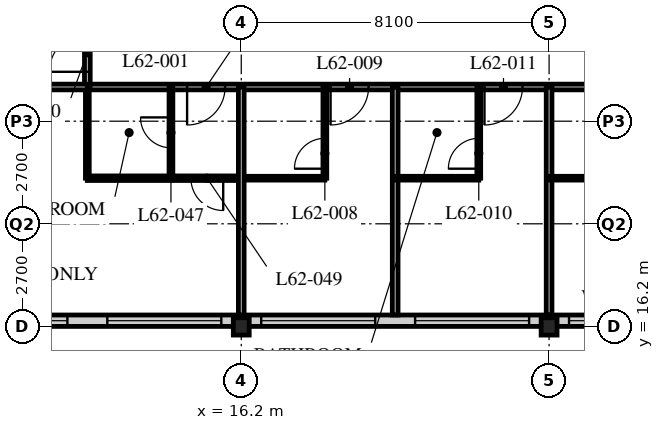
"""IFC4 building model, lengths in metres.
Left out: names, types, materials, properties, quantities, classifications, styles, units other than length and angle.
Written with IfcOpenShell. Run it as: python <this file> out.ifc"""

import sys

from ifc_helpers import new_model, si_unit, direction, frame, frame_2d, origin, origin_2d, place, context, subcontext, project, spatial, rectangle, i_section, extrude, element, fill, save


model = new_model("IFC4")
c1 = context("Model", 3, precision=1e-05, world=origin(), true_north=direction((0.0, 1.0)))
c2 = subcontext(c1, "Body", "Model", "MODEL_VIEW")
j1 = project(units=[si_unit("LENGTHUNIT", "METRE"), si_unit("PLANEANGLEUNIT", "RADIAN")], contexts=[c1])
p1 = place(None, origin())
s1 = spatial("IfcSite", under=j1, at=p1, CompositionType="ELEMENT")
p2 = place(p1, origin())
s2 = spatial("IfcBuilding", under=s1, at=p2, CompositionType="ELEMENT")
p3 = place(p2, frame((0.0, 0.0, 242.4)))
s3 = spatial("IfcBuildingStorey", under=s2, at=p3, CompositionType="ELEMENT", Elevation=242.4)
for number, where, z_axis, x_axis in (
    (1, (16.2, 16.2, 0.0), (0.0, 0.0, 1.0), (1.0, 0.0, 0.0)),
    (2, (24.3, 16.2, 0.0), (0.0, 0.0, 1.0), (1.0, 0.0, 0.0)),
):
    element("IfcColumn", number, at=place(p3, frame(where, z_axis=z_axis, x_axis=x_axis)), inside=s3, PredefinedType="COLUMN", context=c2, shape_type="SweptSolid", body=[
        extrude(i_section(OverallWidth=0.418, OverallDepth=0.456, WebThickness=0.042, FlangeThickness=0.067, FilletRadius=0.015, at=origin_2d()), origin(), (0.0, 0.0, 1.0), 3.9),
    ])
p4 = place(p3, frame((8.4, 16.35, 0.0), z_axis=(0.0, 0.0, 1.0), x_axis=(1.0, 0.0, 0.0)))
e3 = element("IfcWall", 3, at=p4, inside=s3, PredefinedType="SOLIDWALL", context=c2, shape_type="SweptSolid", body=[
    extrude(rectangle(XDim=40.2, YDim=0.3, at=frame_2d((20.1, 0.0))), origin(), (0.0, 0.0, 1.0), 3.69),
])
p5 = place(p4, frame((21.475, 0.0, 0.0)))
e4 = element("IfcOpeningElement", 4, at=p5, cuts=e3, PredefinedType="OPENING", context=c2, shape_type="SweptSolid", body=[
    extrude(rectangle(XDim=1.0, YDim=2.1, at=frame_2d((0.5, 1.05))), frame((0.0, 0.16, 0.0), z_axis=(0.0, -1.0, 0.0), x_axis=(1.0, 0.0, 0.0)), (0.0, 0.0, 1.0), 0.32),
])
p6 = place(p4, frame((0.225, 0.0, 0.6)))
e5 = element("IfcOpeningElement", 5, at=p6, cuts=e3, PredefinedType="OPENING", context=c2, shape_type="SweptSolid", body=[
    extrude(rectangle(XDim=3.0, YDim=2.3, at=frame_2d((1.5, 1.15))), frame((0.0, 0.16, 0.0), z_axis=(0.0, -1.0, 0.0), x_axis=(1.0, 0.0, 0.0)), (0.0, 0.0, 1.0), 0.32),
])
p7 = place(p4, frame((4.275, 0.0, 0.6)))
e6 = element("IfcOpeningElement", 6, at=p7, cuts=e3, PredefinedType="OPENING", context=c2, shape_type="SweptSolid", body=[
    extrude(rectangle(XDim=3.0, YDim=2.3, at=frame_2d((1.5, 1.15))), frame((0.0, 0.16, 0.0), z_axis=(0.0, -1.0, 0.0), x_axis=(1.0, 0.0, 0.0)), (0.0, 0.0, 1.0), 0.32),
])
p8 = place(p4, frame((8.325, 0.0, 0.6)))
e7 = element("IfcOpeningElement", 7, at=p8, cuts=e3, PredefinedType="OPENING", context=c2, shape_type="SweptSolid", body=[
    extrude(rectangle(XDim=3.0, YDim=2.3, at=frame_2d((1.5, 1.15))), frame((0.0, 0.16, 0.0), z_axis=(0.0, -1.0, 0.0), x_axis=(1.0, 0.0, 0.0)), (0.0, 0.0, 1.0), 0.32),
])
p9 = place(p4, frame((12.375, 0.0, 0.6)))
e8 = element("IfcOpeningElement", 8, at=p9, cuts=e3, PredefinedType="OPENING", context=c2, shape_type="SweptSolid", body=[
    extrude(rectangle(XDim=3.0, YDim=2.3, at=frame_2d((1.5, 1.15))), frame((0.0, 0.16, 0.0), z_axis=(0.0, -1.0, 0.0), x_axis=(1.0, 0.0, 0.0)), (0.0, 0.0, 1.0), 0.32),
])
p10 = place(p4, frame((16.425, 0.0, 0.6)))
e9 = element("IfcOpeningElement", 9, at=p10, cuts=e3, PredefinedType="OPENING", context=c2, shape_type="SweptSolid", body=[
    extrude(rectangle(XDim=3.0, YDim=2.3, at=frame_2d((1.5, 1.15))), frame((0.0, 0.16, 0.0), z_axis=(0.0, -1.0, 0.0), x_axis=(1.0, 0.0, 0.0)), (0.0, 0.0, 1.0), 0.32),
])
p11 = place(p4, frame((24.525, 0.0, 0.6)))
e10 = element("IfcOpeningElement", 10, at=p11, cuts=e3, PredefinedType="OPENING", context=c2, shape_type="SweptSolid", body=[
    extrude(rectangle(XDim=3.0, YDim=2.3, at=frame_2d((1.5, 1.15))), frame((0.0, 0.16, 0.0), z_axis=(0.0, -1.0, 0.0), x_axis=(1.0, 0.0, 0.0)), (0.0, 0.0, 1.0), 0.32),
])
p12 = place(p4, frame((28.575, 0.0, 0.6)))
e11 = element("IfcOpeningElement", 11, at=p12, cuts=e3, PredefinedType="OPENING", context=c2, shape_type="SweptSolid", body=[
    extrude(rectangle(XDim=3.0, YDim=2.3, at=frame_2d((1.5, 1.15))), frame((0.0, 0.16, 0.0), z_axis=(0.0, -1.0, 0.0), x_axis=(1.0, 0.0, 0.0)), (0.0, 0.0, 1.0), 0.32),
])
p13 = place(p4, frame((32.625, 0.0, 0.6)))
e12 = element("IfcOpeningElement", 12, at=p13, cuts=e3, PredefinedType="OPENING", context=c2, shape_type="SweptSolid", body=[
    extrude(rectangle(XDim=3.0, YDim=2.3, at=frame_2d((1.5, 1.15))), frame((0.0, 0.16, 0.0), z_axis=(0.0, -1.0, 0.0), x_axis=(1.0, 0.0, 0.0)), (0.0, 0.0, 1.0), 0.32),
])
p14 = place(p4, frame((36.675, 0.0, 0.6)))
e13 = element("IfcOpeningElement", 13, at=p14, cuts=e3, PredefinedType="OPENING", context=c2, shape_type="SweptSolid", body=[
    extrude(rectangle(XDim=3.0, YDim=2.3, at=frame_2d((1.5, 1.15))), frame((0.0, 0.16, 0.0), z_axis=(0.0, -1.0, 0.0), x_axis=(1.0, 0.0, 0.0)), (0.0, 0.0, 1.0), 0.32),
])
p15 = place(p3, frame((12.15, 22.5, 0.0), z_axis=(0.0, 0.0, 1.0), x_axis=(1.0, 0.0, 0.0)))
e14 = element("IfcWall", 14, at=p15, inside=s3, PredefinedType="PARTITIONING", context=c2, shape_type="SweptSolid", body=[
    extrude(rectangle(XDim=32.4, YDim=0.15, at=frame_2d((16.2, 0.0))), origin(), (0.0, 0.0, 1.0), 3.69),
])
p16 = place(p15, frame((6.4, 0.0, 0.0)))
e15 = element("IfcOpeningElement", 15, at=p16, cuts=e14, PredefinedType="OPENING", context=c2, shape_type="SweptSolid", body=[
    extrude(rectangle(XDim=1.0, YDim=2.1, at=frame_2d((0.5, 1.05))), frame((0.0, 0.085, 0.0), z_axis=(0.0, -1.0, 0.0), x_axis=(1.0, 0.0, 0.0)), (0.0, 0.0, 1.0), 0.17),
])
p17 = place(p15, frame((10.45, 0.0, 0.0)))
e16 = element("IfcOpeningElement", 16, at=p17, cuts=e14, PredefinedType="OPENING", context=c2, shape_type="SweptSolid", body=[
    extrude(rectangle(XDim=1.0, YDim=2.1, at=frame_2d((0.5, 1.05))), frame((0.0, 0.085, 0.0), z_axis=(0.0, -1.0, 0.0), x_axis=(1.0, 0.0, 0.0)), (0.0, 0.0, 1.0), 0.17),
])
p18 = place(p15, frame((14.5, 0.0, 0.0)))
e17 = element("IfcOpeningElement", 17, at=p18, cuts=e14, PredefinedType="OPENING", context=c2, shape_type="SweptSolid", body=[
    extrude(rectangle(XDim=1.0, YDim=2.1, at=frame_2d((0.5, 1.05))), frame((0.0, 0.085, 0.0), z_axis=(0.0, -1.0, 0.0), x_axis=(1.0, 0.0, 0.0)), (0.0, 0.0, 1.0), 0.17),
])
p19 = place(p15, frame((17.725, 0.0, 0.0)))
e18 = element("IfcOpeningElement", 18, at=p19, cuts=e14, PredefinedType="OPENING", context=c2, shape_type="SweptSolid", body=[
    extrude(rectangle(XDim=1.0, YDim=2.1, at=frame_2d((0.5, 1.05))), frame((0.0, 0.085, 0.0), z_axis=(0.0, -1.0, 0.0), x_axis=(1.0, 0.0, 0.0)), (0.0, 0.0, 1.0), 0.17),
])
p20 = place(p15, frame((22.6, 0.0, 0.0)))
e19 = element("IfcOpeningElement", 19, at=p20, cuts=e14, PredefinedType="OPENING", context=c2, shape_type="SweptSolid", body=[
    extrude(rectangle(XDim=1.0, YDim=2.1, at=frame_2d((0.5, 1.05))), frame((0.0, 0.085, 0.0), z_axis=(0.0, -1.0, 0.0), x_axis=(1.0, 0.0, 0.0)), (0.0, 0.0, 1.0), 0.17),
])
p21 = place(p15, frame((26.65, 0.0, 0.0)))
e20 = element("IfcOpeningElement", 20, at=p21, cuts=e14, PredefinedType="OPENING", context=c2, shape_type="SweptSolid", body=[
    extrude(rectangle(XDim=1.0, YDim=2.1, at=frame_2d((0.5, 1.05))), frame((0.0, 0.085, 0.0), z_axis=(0.0, -1.0, 0.0), x_axis=(1.0, 0.0, 0.0)), (0.0, 0.0, 1.0), 0.17),
])
p22 = place(p15, frame((2.625, 0.0, 0.0)))
e21 = element("IfcOpeningElement", 21, at=p22, cuts=e14, PredefinedType="OPENING", context=c2, shape_type="SweptSolid", body=[
    extrude(rectangle(XDim=1.0, YDim=2.1, at=frame_2d((0.5, 1.05))), frame((0.0, 0.085, 0.0), z_axis=(0.0, -1.0, 0.0), x_axis=(1.0, 0.0, 0.0)), (0.0, 0.0, 1.0), 0.17),
])
p23 = place(p15, frame((28.775, 0.0, 0.0)))
e22 = element("IfcOpeningElement", 22, at=p23, cuts=e14, PredefinedType="OPENING", context=c2, shape_type="SweptSolid", body=[
    extrude(rectangle(XDim=1.0, YDim=2.1, at=frame_2d((0.5, 1.05))), frame((0.0, 0.085, 0.0), z_axis=(0.0, -1.0, 0.0), x_axis=(1.0, 0.0, 0.0)), (0.0, 0.0, 1.0), 0.17),
])
p24 = place(p3, frame((12.15, 22.5, 0.0), z_axis=(0.0, 0.0, 1.0), x_axis=(0.0, 1.0, 0.0)))
e23 = element("IfcWall", 23, at=p24, inside=s3, PredefinedType="PARTITIONING", context=c2, shape_type="SweptSolid", body=[
    extrude(rectangle(XDim=26.1, YDim=0.15, at=frame_2d((13.05, 0.0))), origin(), (0.0, 0.0, 1.0), 3.69),
])
p25 = place(p24, frame((0.4, 0.0, 0.0)))
e24 = element("IfcOpeningElement", 24, at=p25, cuts=e23, PredefinedType="OPENING", context=c2, shape_type="SweptSolid", body=[
    extrude(rectangle(XDim=1.0, YDim=2.1, at=frame_2d((0.5, 1.05))), frame((0.0, 0.085, 0.0), z_axis=(0.0, -1.0, 0.0), x_axis=(1.0, 0.0, 0.0)), (0.0, 0.0, 1.0), 0.17),
])
p26 = place(p24, frame((14.35, 0.0, 0.0)))
e25 = element("IfcOpeningElement", 25, at=p26, cuts=e23, PredefinedType="OPENING", context=c2, shape_type="SweptSolid", body=[
    extrude(rectangle(XDim=1.0, YDim=2.1, at=frame_2d((0.5, 1.05))), frame((0.0, 0.085, 0.0), z_axis=(0.0, -1.0, 0.0), x_axis=(1.0, 0.0, 0.0)), (0.0, 0.0, 1.0), 0.17),
])
p27 = place(p3, frame((16.2, 20.1, 0.0), z_axis=(0.0, 0.0, 1.0), x_axis=(1.0, 0.0, 0.0)))
e26 = element("IfcWall", 26, at=p27, inside=s3, PredefinedType="PARTITIONING", context=c2, shape_type="SweptSolid", body=[
    extrude(rectangle(XDim=2.2, YDim=0.1, at=frame_2d((1.1, 0.0))), origin(), (0.0, 0.0, 1.0), 3.69),
])
p28 = place(p3, frame((18.4, 22.5, 0.0), z_axis=(0.0, 0.0, 1.0), x_axis=(0.0, -1.0, 0.0)))
e27 = element("IfcWall", 27, at=p28, inside=s3, PredefinedType="PARTITIONING", context=c2, shape_type="SweptSolid", body=[
    extrude(rectangle(XDim=2.4, YDim=0.1, at=frame_2d((1.2, 0.0))), origin(), (0.0, 0.0, 1.0), 3.69),
])
p29 = place(p28, frame((1.35, 0.0, 0.0)))
e28 = element("IfcOpeningElement", 28, at=p29, cuts=e27, PredefinedType="OPENING", context=c2, shape_type="SweptSolid", body=[
    extrude(rectangle(XDim=0.8, YDim=2.1, at=frame_2d((0.4, 1.05))), frame((0.0, 0.06, 0.0), z_axis=(0.0, -1.0, 0.0), x_axis=(1.0, 0.0, 0.0)), (0.0, 0.0, 1.0), 0.12),
])
p30 = place(p3, frame((20.25, 22.5, 0.0), z_axis=(0.0, 0.0, 1.0), x_axis=(0.0, -1.0, 0.0)))
e29 = element("IfcWall", 29, at=p30, inside=s3, PredefinedType="PARTITIONING", context=c2, shape_type="SweptSolid", body=[
    extrude(rectangle(XDim=6.0, YDim=0.15, at=frame_2d((3.0, 0.0))), origin(), (0.0, 0.0, 1.0), 3.69),
])
p31 = place(p3, frame((20.25, 20.1, 0.0), z_axis=(0.0, 0.0, 1.0), x_axis=(1.0, 0.0, 0.0)))
e30 = element("IfcWall", 30, at=p31, inside=s3, PredefinedType="PARTITIONING", context=c2, shape_type="SweptSolid", body=[
    extrude(rectangle(XDim=2.2, YDim=0.1, at=frame_2d((1.1, 0.0))), origin(), (0.0, 0.0, 1.0), 3.69),
])
p32 = place(p3, frame((22.45, 22.5, 0.0), z_axis=(0.0, 0.0, 1.0), x_axis=(0.0, -1.0, 0.0)))
e31 = element("IfcWall", 31, at=p32, inside=s3, PredefinedType="PARTITIONING", context=c2, shape_type="SweptSolid", body=[
    extrude(rectangle(XDim=2.4, YDim=0.1, at=frame_2d((1.2, 0.0))), origin(), (0.0, 0.0, 1.0), 3.69),
])
p33 = place(p32, frame((1.35, 0.0, 0.0)))
e32 = element("IfcOpeningElement", 32, at=p33, cuts=e31, PredefinedType="OPENING", context=c2, shape_type="SweptSolid", body=[
    extrude(rectangle(XDim=0.8, YDim=2.1, at=frame_2d((0.4, 1.05))), frame((0.0, 0.06, 0.0), z_axis=(0.0, -1.0, 0.0), x_axis=(1.0, 0.0, 0.0)), (0.0, 0.0, 1.0), 0.12),
])
p34 = place(p3, frame((24.3, 22.5, 0.0), z_axis=(0.0, 0.0, 1.0), x_axis=(0.0, -1.0, 0.0)))
e33 = element("IfcWall", 33, at=p34, inside=s3, PredefinedType="PARTITIONING", context=c2, shape_type="SweptSolid", body=[
    extrude(rectangle(XDim=6.0, YDim=0.15, at=frame_2d((3.0, 0.0))), origin(), (0.0, 0.0, 1.0), 2.928),
])
p35 = place(p3, frame((24.3, 20.1, 0.0), z_axis=(0.0, 0.0, 1.0), x_axis=(1.0, 0.0, 0.0)))
e34 = element("IfcWall", 34, at=p35, inside=s3, PredefinedType="PARTITIONING", context=c2, shape_type="SweptSolid", body=[
    extrude(rectangle(XDim=2.2, YDim=0.1, at=frame_2d((1.1, 0.0))), origin(), (0.0, 0.0, 1.0), 3.69),
])
p36 = place(p3, frame((12.15, 20.1, 0.0), z_axis=(0.0, 0.0, 1.0), x_axis=(1.0, 0.0, 0.0)))
e35 = element("IfcWall", 35, at=p36, inside=s3, PredefinedType="PARTITIONING", context=c2, shape_type="SweptSolid", body=[
    extrude(rectangle(XDim=4.05, YDim=0.12, at=frame_2d((2.025, 0.0))), origin(), (0.0, 0.0, 1.0), 3.69),
])
p37 = place(p36, frame((2.725, 0.0, 0.0)))
e36 = element("IfcOpeningElement", 36, at=p37, cuts=e35, PredefinedType="OPENING", context=c2, shape_type="SweptSolid", body=[
    extrude(rectangle(XDim=0.85, YDim=2.1, at=frame_2d((0.425, 1.05))), frame((0.0, 0.07, 0.0), z_axis=(0.0, -1.0, 0.0), x_axis=(1.0, 0.0, 0.0)), (0.0, 0.0, 1.0), 0.14),
])
p38 = place(p3, frame((14.35, 22.5, 0.0), z_axis=(0.0, 0.0, 1.0), x_axis=(0.0, -1.0, 0.0)))
e37 = element("IfcWall", 37, at=p38, inside=s3, PredefinedType="PARTITIONING", context=c2, shape_type="SweptSolid", body=[
    extrude(rectangle(XDim=2.4, YDim=0.1, at=frame_2d((1.2, 0.0))), origin(), (0.0, 0.0, 1.0), 3.69),
])
p39 = place(p38, frame((0.8, 0.0, 0.0)))
e38 = element("IfcOpeningElement", 38, at=p39, cuts=e37, PredefinedType="OPENING", context=c2, shape_type="SweptSolid", body=[
    extrude(rectangle(XDim=0.8, YDim=2.1, at=frame_2d((0.4, 1.05))), frame((0.0, 0.06, 0.0), z_axis=(0.0, -1.0, 0.0), x_axis=(1.0, 0.0, 0.0)), (0.0, 0.0, 1.0), 0.12),
])
p40 = place(p3, frame((12.15, 22.5, 0.0), z_axis=(0.0, 0.0, 1.0), x_axis=(0.0, -1.0, 0.0)))
e39 = element("IfcWall", 39, at=p40, inside=s3, PredefinedType="PARTITIONING", context=c2, shape_type="SweptSolid", body=[
    extrude(rectangle(XDim=2.4, YDim=0.1, at=frame_2d((1.2, 0.0))), origin(), (0.0, 0.0, 1.0), 3.69),
])
p41 = place(p3, frame((4.35, 22.5, 0.0), z_axis=(0.0, 0.0, 1.0), x_axis=(1.0, 0.0, 0.0)))
e40 = element("IfcWall", 40, at=p41, inside=s3, PredefinedType="PARTITIONING", context=c2, shape_type="SweptSolid", body=[
    extrude(rectangle(XDim=7.8, YDim=0.15, at=frame_2d((3.9, 0.0))), origin(), (0.0, 0.0, 1.0), 3.69),
])
p42 = place(p3, frame((16.2, 22.5, 0.0), z_axis=(0.0, 0.0, 1.0), x_axis=(0.0, -1.0, 0.0)))
e41 = element("IfcWall", 41, at=p42, inside=s3, PredefinedType="PARTITIONING", context=c2, shape_type="SweptSolid", body=[
    extrude(rectangle(XDim=6.0, YDim=0.15, at=frame_2d((3.0, 0.0))), origin(), (0.0, 0.0, 1.0), 2.928),
])
p43 = place(p6, origin())
e42 = element("IfcWindow", 42, at=p43, inside=s3, PartitioningType="SINGLE_PANEL", PredefinedType="WINDOW", context=c2, shape_type="SweptSolid", body=[
    extrude(rectangle(XDim=3.0, YDim=2.3, at=frame_2d((1.5, 1.15))), frame((0.0, 0.03, 0.0), z_axis=(0.0, -1.0, 0.0), x_axis=(1.0, 0.0, 0.0)), (0.0, 0.0, 1.0), 0.06),
])
fill(e5, e42)
p44 = place(p7, origin())
e43 = element("IfcWindow", 43, at=p44, inside=s3, PartitioningType="SINGLE_PANEL", PredefinedType="WINDOW", context=c2, shape_type="SweptSolid", body=[
    extrude(rectangle(XDim=3.0, YDim=2.3, at=frame_2d((1.5, 1.15))), frame((0.0, 0.03, 0.0), z_axis=(0.0, -1.0, 0.0), x_axis=(1.0, 0.0, 0.0)), (0.0, 0.0, 1.0), 0.06),
])
fill(e6, e43)
p45 = place(p8, origin())
e44 = element("IfcWindow", 44, at=p45, inside=s3, PartitioningType="SINGLE_PANEL", PredefinedType="WINDOW", context=c2, shape_type="SweptSolid", body=[
    extrude(rectangle(XDim=3.0, YDim=2.3, at=frame_2d((1.5, 1.15))), frame((0.0, 0.03, 0.0), z_axis=(0.0, -1.0, 0.0), x_axis=(1.0, 0.0, 0.0)), (0.0, 0.0, 1.0), 0.06),
])
fill(e7, e44)
p46 = place(p9, origin())
e45 = element("IfcWindow", 45, at=p46, inside=s3, PartitioningType="SINGLE_PANEL", PredefinedType="WINDOW", context=c2, shape_type="SweptSolid", body=[
    extrude(rectangle(XDim=3.0, YDim=2.3, at=frame_2d((1.5, 1.15))), frame((0.0, 0.03, 0.0), z_axis=(0.0, -1.0, 0.0), x_axis=(1.0, 0.0, 0.0)), (0.0, 0.0, 1.0), 0.06),
])
fill(e8, e45)
p47 = place(p10, origin())
e46 = element("IfcWindow", 46, at=p47, inside=s3, PartitioningType="SINGLE_PANEL", PredefinedType="WINDOW", context=c2, shape_type="SweptSolid", body=[
    extrude(rectangle(XDim=3.0, YDim=2.3, at=frame_2d((1.5, 1.15))), frame((0.0, 0.03, 0.0), z_axis=(0.0, -1.0, 0.0), x_axis=(1.0, 0.0, 0.0)), (0.0, 0.0, 1.0), 0.06),
])
fill(e9, e46)
p48 = place(p29, origin())
e47 = element("IfcDoor", 47, at=p48, inside=s3, OperationType="SINGLE_SWING_LEFT", PredefinedType="DOOR", context=c2, shape_type="SweptSolid", body=[
    extrude(rectangle(XDim=0.8, YDim=2.1, at=frame_2d((0.4, 1.05))), frame((0.0, 0.025, 0.0), z_axis=(0.0, -1.0, 0.0), x_axis=(1.0, 0.0, 0.0)), (0.0, 0.0, 1.0), 0.05),
])
fill(e28, e47)
p49 = place(p16, origin())
e48 = element("IfcDoor", 48, at=p49, inside=s3, OperationType="SINGLE_SWING_RIGHT", PredefinedType="DOOR", context=c2, shape_type="SweptSolid", body=[
    extrude(rectangle(XDim=1.0, YDim=2.1, at=frame_2d((0.5, 1.05))), frame((0.0, 0.025, 0.0), z_axis=(0.0, -1.0, 0.0), x_axis=(1.0, 0.0, 0.0)), (0.0, 0.0, 1.0), 0.05),
])
fill(e15, e48)
p50 = place(p33, origin())
e49 = element("IfcDoor", 49, at=p50, inside=s3, OperationType="SINGLE_SWING_LEFT", PredefinedType="DOOR", context=c2, shape_type="SweptSolid", body=[
    extrude(rectangle(XDim=0.8, YDim=2.1, at=frame_2d((0.4, 1.05))), frame((0.0, 0.025, 0.0), z_axis=(0.0, -1.0, 0.0), x_axis=(1.0, 0.0, 0.0)), (0.0, 0.0, 1.0), 0.05),
])
fill(e32, e49)
p51 = place(p17, origin())
e50 = element("IfcDoor", 50, at=p51, inside=s3, OperationType="SINGLE_SWING_RIGHT", PredefinedType="DOOR", context=c2, shape_type="SweptSolid", body=[
    extrude(rectangle(XDim=1.0, YDim=2.1, at=frame_2d((0.5, 1.05))), frame((0.0, 0.025, 0.0), z_axis=(0.0, -1.0, 0.0), x_axis=(1.0, 0.0, 0.0)), (0.0, 0.0, 1.0), 0.05),
])
fill(e16, e50)
p52 = place(p25, origin())
e51 = element("IfcDoor", 51, at=p52, inside=s3, OperationType="SINGLE_SWING_LEFT", PredefinedType="DOOR", context=c2, shape_type="SweptSolid", body=[
    extrude(rectangle(XDim=1.0, YDim=2.1, at=frame_2d((0.5, 1.05))), frame((0.0, 0.025, 0.0), z_axis=(0.0, -1.0, 0.0), x_axis=(1.0, 0.0, 0.0)), (0.0, 0.0, 1.0), 0.05),
])
fill(e24, e51)
p53 = place(p39, origin())
e52 = element("IfcDoor", 52, at=p53, inside=s3, OperationType="SINGLE_SWING_RIGHT", PredefinedType="DOOR", context=c2, shape_type="SweptSolid", body=[
    extrude(rectangle(XDim=0.8, YDim=2.1, at=frame_2d((0.4, 1.05))), frame((0.0, 0.025, 0.0), z_axis=(0.0, -1.0, 0.0), x_axis=(1.0, 0.0, 0.0)), (0.0, 0.0, 1.0), 0.05),
])
fill(e38, e52)
p54 = place(p22, origin())
e53 = element("IfcDoor", 53, at=p54, inside=s3, OperationType="SINGLE_SWING_RIGHT", PredefinedType="DOOR", context=c2, shape_type="SweptSolid", body=[
    extrude(rectangle(XDim=1.0, YDim=2.1, at=frame_2d((0.5, 1.05))), frame((0.0, 0.025, 0.0), z_axis=(0.0, -1.0, 0.0), x_axis=(1.0, 0.0, 0.0)), (0.0, 0.0, 1.0), 0.05),
])
fill(e21, e53)
p55 = place(p37, origin())
e54 = element("IfcDoor", 54, at=p55, inside=s3, OperationType="SINGLE_SWING_LEFT", PredefinedType="DOOR", context=c2, shape_type="SweptSolid", body=[
    extrude(rectangle(XDim=0.85, YDim=2.1, at=frame_2d((0.425, 1.05))), frame((0.0, 0.025, 0.0), z_axis=(0.0, -1.0, 0.0), x_axis=(1.0, 0.0, 0.0)), (0.0, 0.0, 1.0), 0.05),
])
fill(e36, e54)
save(model, sys.argv[1])
